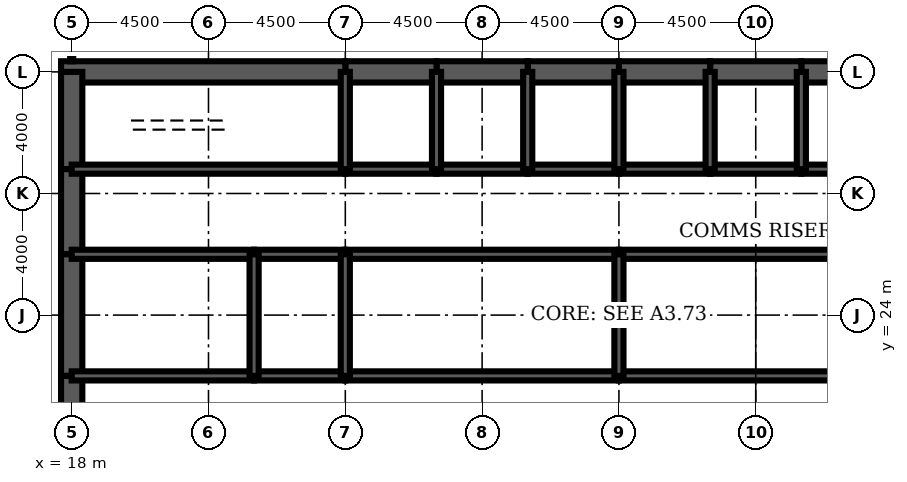
"""IFC4 building model, lengths in metres.
Left out: names, types, materials, properties, quantities, classifications, styles, units other than length and angle.
Written with IfcOpenShell. Run it as: python <this file> out.ifc"""

import sys

from ifc_helpers import new_model, si_unit, direction, frame, frame_2d, origin, place, context, subcontext, project, spatial, rectangle, extrude, element, fill, save


model = new_model("IFC4")
c1 = context("Model", 3, precision=1e-05, world=origin(), true_north=direction((0.0, 1.0)))
c2 = subcontext(c1, "Body", "Model", "MODEL_VIEW")
j1 = project(units=[si_unit("LENGTHUNIT", "METRE"), si_unit("PLANEANGLEUNIT", "RADIAN")], contexts=[c1])
p1 = place(None, origin())
s1 = spatial("IfcSite", under=j1, at=p1, CompositionType="ELEMENT")
p2 = place(p1, origin())
s2 = spatial("IfcBuilding", under=s1, at=p2, CompositionType="ELEMENT")
p3 = place(p2, frame((0.0, 0.0, 313.1)))
s3 = spatial("IfcBuildingStorey", under=s2, at=p3, CompositionType="ELEMENT", Elevation=313.1)
for number, where, z_axis, x_axis in (
    (1, (45.0, 32.0, 0.0), (0.0, 0.0, 1.0), (-1.0, 0.0, 0.0)),
    (2, (42.0, 32.0, 0.0), (0.0, 0.0, 1.0), (-1.0, 0.0, 0.0)),
    (3, (39.0, 32.0, 0.0), (0.0, 0.0, 1.0), (-1.0, 0.0, 0.0)),
    (4, (36.0, 32.0, 0.0), (0.0, 0.0, 1.0), (-1.0, 0.0, 0.0)),
    (5, (33.0, 32.0, 0.0), (0.0, 0.0, 1.0), (-1.0, 0.0, 0.0)),
    (6, (30.0, 32.0, 0.0), (0.0, 0.0, 1.0), (-1.0, 0.0, 0.0)),
):
    element("IfcWall", number, at=place(p3, frame(where, z_axis=z_axis, x_axis=x_axis)), inside=s3, PredefinedType="SHEAR", context=c2, shape_type="SweptSolid", body=[
        extrude(rectangle(XDim=3.0, YDim=0.7, at=frame_2d((1.5, 0.0))), origin(), (0.0, 0.0, 1.0), 4.2),
    ])
p4 = place(p3, frame((27.0, 32.0, 0.0), z_axis=(0.0, 0.0, 1.0), x_axis=(-1.0, 0.0, 0.0)))
e7 = element("IfcWall", 7, at=p4, inside=s3, PredefinedType="SHEAR", context=c2, shape_type="SweptSolid", body=[
    extrude(rectangle(XDim=9.35, YDim=0.7, at=frame_2d((4.675, 0.0))), origin(), (0.0, 0.0, 1.0), 4.2),
])
p5 = place(p3, frame((18.0, 32.0, 0.0), z_axis=(0.0, 0.0, 1.0), x_axis=(0.0, -1.0, 0.0)))
e8 = element("IfcWall", 8, at=p5, inside=s3, PredefinedType="SHEAR", context=c2, shape_type="SweptSolid", body=[
    extrude(rectangle(XDim=3.2, YDim=0.7, at=frame_2d((1.6, 0.0))), origin(), (0.0, 0.0, 1.0), 4.2),
])
p6 = place(p3, frame((18.0, 28.8, 0.0), z_axis=(0.0, 0.0, 1.0), x_axis=(0.0, -1.0, 0.0)))
e9 = element("IfcWall", 9, at=p6, inside=s3, PredefinedType="SHEAR", context=c2, shape_type="SweptSolid", body=[
    extrude(rectangle(XDim=2.8, YDim=0.7, at=frame_2d((1.4, 0.0))), origin(), (0.0, 0.0, 1.0), 4.2),
])
p7 = place(p6, frame((0.4, 0.0, 0.0)))
e10 = element("IfcOpeningElement", 10, at=p7, cuts=e9, PredefinedType="OPENING", context=c2, shape_type="SweptSolid", body=[
    extrude(rectangle(XDim=1.8, YDim=2.1, at=frame_2d((0.9, 1.05))), frame((0.0, 0.36, 0.0), z_axis=(0.0, -1.0, 0.0), x_axis=(1.0, 0.0, 0.0)), (0.0, 0.0, 1.0), 0.72),
])
p8 = place(p3, frame((18.0, 26.0, 0.0), z_axis=(0.0, 0.0, 1.0), x_axis=(0.0, -1.0, 0.0)))
e11 = element("IfcWall", 11, at=p8, inside=s3, PredefinedType="SHEAR", context=c2, shape_type="SweptSolid", body=[
    extrude(rectangle(XDim=4.0, YDim=0.7, at=frame_2d((2.0, 0.0))), origin(), (0.0, 0.0, 1.0), 4.2),
])
p9 = place(p3, frame((18.0, 22.0, 0.0), z_axis=(0.0, 0.0, 1.0), x_axis=(0.0, -1.0, 0.0)))
e12 = element("IfcWall", 12, at=p9, inside=s3, PredefinedType="SHEAR", context=c2, shape_type="SweptSolid", body=[
    extrude(rectangle(XDim=2.8, YDim=0.7, at=frame_2d((1.4, 0.0))), origin(), (0.0, 0.0, 1.0), 4.2),
])
p10 = place(p9, frame((0.6, 0.0, 0.0)))
e13 = element("IfcOpeningElement", 13, at=p10, cuts=e12, PredefinedType="OPENING", context=c2, shape_type="SweptSolid", body=[
    extrude(rectangle(XDim=1.8, YDim=2.1, at=frame_2d((0.9, 1.05))), frame((0.0, 0.36, 0.0), z_axis=(0.0, -1.0, 0.0), x_axis=(1.0, 0.0, 0.0)), (0.0, 0.0, 1.0), 0.72),
])
p11 = place(p3, frame((18.0, 28.8, 0.0), z_axis=(0.0, 0.0, 1.0), x_axis=(1.0, 0.0, 0.0)))
e14 = element("IfcWall", 14, at=p11, inside=s3, PredefinedType="SOLIDWALL", context=c2, shape_type="SweptSolid", body=[
    extrude(rectangle(XDim=9.0, YDim=0.3, at=frame_2d((4.5, 0.0))), origin(), (0.0, 0.0, 1.0), 4.2),
])
p12 = place(p11, frame((0.65, 0.0, 0.0)))
e15 = element("IfcOpeningElement", 15, at=p12, cuts=e14, PredefinedType="OPENING", context=c2, shape_type="SweptSolid", body=[
    extrude(rectangle(XDim=1.0, YDim=2.1, at=frame_2d((0.5, 1.05))), frame((0.0, 0.16, 0.0), z_axis=(0.0, -1.0, 0.0), x_axis=(1.0, 0.0, 0.0)), (0.0, 0.0, 1.0), 0.32),
])
p13 = place(p3, frame((27.0, 28.8, 0.0), z_axis=(0.0, 0.0, 1.0), x_axis=(1.0, 0.0, 0.0)))
e16 = element("IfcWall", 16, at=p13, inside=s3, PredefinedType="SOLIDWALL", context=c2, shape_type="SweptSolid", body=[
    extrude(rectangle(XDim=3.0, YDim=0.3, at=frame_2d((1.5, 0.0))), origin(), (0.0, 0.0, 1.0), 4.2),
])
p14 = place(p13, frame((0.95, 0.0, 0.0)))
e17 = element("IfcOpeningElement", 17, at=p14, cuts=e16, PredefinedType="OPENING", context=c2, shape_type="SweptSolid", body=[
    extrude(rectangle(XDim=1.1, YDim=2.2, at=frame_2d((0.55, 1.1))), frame((0.0, 0.16, 0.0), z_axis=(0.0, -1.0, 0.0), x_axis=(1.0, 0.0, 0.0)), (0.0, 0.0, 1.0), 0.32),
])
p15 = place(p3, frame((30.0, 28.8, 0.0), z_axis=(0.0, 0.0, 1.0), x_axis=(1.0, 0.0, 0.0)))
e18 = element("IfcWall", 18, at=p15, inside=s3, PredefinedType="SOLIDWALL", context=c2, shape_type="SweptSolid", body=[
    extrude(rectangle(XDim=3.0, YDim=0.3, at=frame_2d((1.5, 0.0))), origin(), (0.0, 0.0, 1.0), 4.2),
])
p16 = place(p15, frame((0.95, 0.0, 0.0)))
e19 = element("IfcOpeningElement", 19, at=p16, cuts=e18, PredefinedType="OPENING", context=c2, shape_type="SweptSolid", body=[
    extrude(rectangle(XDim=1.1, YDim=2.2, at=frame_2d((0.55, 1.1))), frame((0.0, 0.16, 0.0), z_axis=(0.0, -1.0, 0.0), x_axis=(1.0, 0.0, 0.0)), (0.0, 0.0, 1.0), 0.32),
])
p17 = place(p3, frame((33.0, 28.8, 0.0), z_axis=(0.0, 0.0, 1.0), x_axis=(1.0, 0.0, 0.0)))
e20 = element("IfcWall", 20, at=p17, inside=s3, PredefinedType="SOLIDWALL", context=c2, shape_type="SweptSolid", body=[
    extrude(rectangle(XDim=3.0, YDim=0.3, at=frame_2d((1.5, 0.0))), origin(), (0.0, 0.0, 1.0), 4.2),
])
p18 = place(p17, frame((0.95, 0.0, 0.0)))
e21 = element("IfcOpeningElement", 21, at=p18, cuts=e20, PredefinedType="OPENING", context=c2, shape_type="SweptSolid", body=[
    extrude(rectangle(XDim=1.1, YDim=2.2, at=frame_2d((0.55, 1.1))), frame((0.0, 0.16, 0.0), z_axis=(0.0, -1.0, 0.0), x_axis=(1.0, 0.0, 0.0)), (0.0, 0.0, 1.0), 0.32),
])
p19 = place(p3, frame((36.0, 28.8, 0.0), z_axis=(0.0, 0.0, 1.0), x_axis=(1.0, 0.0, 0.0)))
e22 = element("IfcWall", 22, at=p19, inside=s3, PredefinedType="SOLIDWALL", context=c2, shape_type="SweptSolid", body=[
    extrude(rectangle(XDim=3.0, YDim=0.3, at=frame_2d((1.5, 0.0))), origin(), (0.0, 0.0, 1.0), 4.2),
])
p20 = place(p19, frame((1.0, 0.0, 0.0)))
e23 = element("IfcOpeningElement", 23, at=p20, cuts=e22, PredefinedType="OPENING", context=c2, shape_type="SweptSolid", body=[
    extrude(rectangle(XDim=1.0, YDim=2.1, at=frame_2d((0.5, 1.05))), frame((0.0, 0.16, 0.0), z_axis=(0.0, -1.0, 0.0), x_axis=(1.0, 0.0, 0.0)), (0.0, 0.0, 1.0), 0.32),
])
p21 = place(p3, frame((39.0, 28.8, 0.0), z_axis=(0.0, 0.0, 1.0), x_axis=(1.0, 0.0, 0.0)))
e24 = element("IfcWall", 24, at=p21, inside=s3, PredefinedType="SOLIDWALL", context=c2, shape_type="SweptSolid", body=[
    extrude(rectangle(XDim=3.0, YDim=0.3, at=frame_2d((1.5, 0.0))), origin(), (0.0, 0.0, 1.0), 4.2),
])
p22 = place(p21, frame((1.0, 0.0, 0.0)))
e25 = element("IfcOpeningElement", 25, at=p22, cuts=e24, PredefinedType="OPENING", context=c2, shape_type="SweptSolid", body=[
    extrude(rectangle(XDim=1.0, YDim=2.1, at=frame_2d((0.5, 1.05))), frame((0.0, 0.16, 0.0), z_axis=(0.0, -1.0, 0.0), x_axis=(1.0, 0.0, 0.0)), (0.0, 0.0, 1.0), 0.32),
])
p23 = place(p3, frame((42.0, 28.8, 0.0), z_axis=(0.0, 0.0, 1.0), x_axis=(1.0, 0.0, 0.0)))
e26 = element("IfcWall", 26, at=p23, inside=s3, PredefinedType="SOLIDWALL", context=c2, shape_type="SweptSolid", body=[
    extrude(rectangle(XDim=3.0, YDim=0.3, at=frame_2d((1.5, 0.0))), origin(), (0.0, 0.0, 1.0), 4.2),
])
p24 = place(p23, frame((0.95, 0.0, 0.0)))
e27 = element("IfcOpeningElement", 27, at=p24, cuts=e26, PredefinedType="OPENING", context=c2, shape_type="SweptSolid", body=[
    extrude(rectangle(XDim=1.1, YDim=2.2, at=frame_2d((0.55, 1.1))), frame((0.0, 0.16, 0.0), z_axis=(0.0, -1.0, 0.0), x_axis=(1.0, 0.0, 0.0)), (0.0, 0.0, 1.0), 0.32),
])
p25 = place(p3, frame((18.0, 22.0, 0.0), z_axis=(0.0, 0.0, 1.0), x_axis=(1.0, 0.0, 0.0)))
e28 = element("IfcWall", 28, at=p25, inside=s3, PredefinedType="SOLIDWALL", context=c2, shape_type="SweptSolid", body=[
    extrude(rectangle(XDim=6.0, YDim=0.3, at=frame_2d((3.0, 0.0))), origin(), (0.0, 0.0, 1.0), 4.2),
])
p26 = place(p25, frame((4.4, 0.0, 0.0)))
e29 = element("IfcOpeningElement", 29, at=p26, cuts=e28, PredefinedType="OPENING", context=c2, shape_type="SweptSolid", body=[
    extrude(rectangle(XDim=1.0, YDim=2.1, at=frame_2d((0.5, 1.05))), frame((0.0, 0.16, 0.0), z_axis=(0.0, -1.0, 0.0), x_axis=(1.0, 0.0, 0.0)), (0.0, 0.0, 1.0), 0.32),
])
p27 = place(p25, frame((0.75, 0.0, 0.0)))
e30 = element("IfcOpeningElement", 30, at=p27, cuts=e28, PredefinedType="OPENING", context=c2, shape_type="SweptSolid", body=[
    extrude(rectangle(XDim=1.0, YDim=2.1, at=frame_2d((0.5, 1.05))), frame((0.0, 0.16, 0.0), z_axis=(0.0, -1.0, 0.0), x_axis=(1.0, 0.0, 0.0)), (0.0, 0.0, 1.0), 0.32),
])
p28 = place(p3, frame((24.0, 22.0, 0.0), z_axis=(0.0, 0.0, 1.0), x_axis=(1.0, 0.0, 0.0)))
e31 = element("IfcWall", 31, at=p28, inside=s3, PredefinedType="SOLIDWALL", context=c2, shape_type="SweptSolid", body=[
    extrude(rectangle(XDim=3.0, YDim=0.3, at=frame_2d((1.5, 0.0))), origin(), (0.0, 0.0, 1.0), 4.2),
])
p29 = place(p28, frame((1.0, 0.0, 0.0)))
e32 = element("IfcOpeningElement", 32, at=p29, cuts=e31, PredefinedType="OPENING", context=c2, shape_type="SweptSolid", body=[
    extrude(rectangle(XDim=1.0, YDim=2.1, at=frame_2d((0.5, 1.05))), frame((0.0, 0.16, 0.0), z_axis=(0.0, -1.0, 0.0), x_axis=(1.0, 0.0, 0.0)), (0.0, 0.0, 1.0), 0.32),
])
p30 = place(p3, frame((27.0, 22.0, 0.0), z_axis=(0.0, 0.0, 1.0), x_axis=(1.0, 0.0, 0.0)))
e33 = element("IfcWall", 33, at=p30, inside=s3, PredefinedType="SOLIDWALL", context=c2, shape_type="SweptSolid", body=[
    extrude(rectangle(XDim=9.0, YDim=0.3, at=frame_2d((4.5, 0.0))), origin(), (0.0, 0.0, 1.0), 4.2),
])
p31 = place(p30, frame((4.0, 0.0, 0.0)))
e34 = element("IfcOpeningElement", 34, at=p31, cuts=e33, PredefinedType="OPENING", context=c2, shape_type="SweptSolid", body=[
    extrude(rectangle(XDim=1.0, YDim=2.1, at=frame_2d((0.5, 1.05))), frame((0.0, 0.16, 0.0), z_axis=(0.0, -1.0, 0.0), x_axis=(1.0, 0.0, 0.0)), (0.0, 0.0, 1.0), 0.32),
])
p32 = place(p3, frame((36.0, 22.0, 0.0), z_axis=(0.0, 0.0, 1.0), x_axis=(1.0, 0.0, 0.0)))
e35 = element("IfcWall", 35, at=p32, inside=s3, PredefinedType="SOLIDWALL", context=c2, shape_type="SweptSolid", body=[
    extrude(rectangle(XDim=9.0, YDim=0.3, at=frame_2d((4.5, 0.0))), origin(), (0.0, 0.0, 1.0), 4.2),
])
p33 = place(p32, frame((4.0, 0.0, 0.0)))
e36 = element("IfcOpeningElement", 36, at=p33, cuts=e35, PredefinedType="OPENING", context=c2, shape_type="SweptSolid", body=[
    extrude(rectangle(XDim=1.0, YDim=2.1, at=frame_2d((0.5, 1.05))), frame((0.0, 0.16, 0.0), z_axis=(0.0, -1.0, 0.0), x_axis=(1.0, 0.0, 0.0)), (0.0, 0.0, 1.0), 0.32),
])
p34 = place(p3, frame((18.0, 26.0, 0.0), z_axis=(0.0, 0.0, 1.0), x_axis=(1.0, 0.0, 0.0)))
e37 = element("IfcWall", 37, at=p34, inside=s3, PredefinedType="SOLIDWALL", context=c2, shape_type="SweptSolid", body=[
    extrude(rectangle(XDim=6.0, YDim=0.3, at=frame_2d((3.0, 0.0))), origin(), (0.0, 0.0, 1.0), 4.2),
])
p35 = place(p3, frame((24.0, 26.0, 0.0), z_axis=(0.0, 0.0, 1.0), x_axis=(1.0, 0.0, 0.0)))
e38 = element("IfcWall", 38, at=p35, inside=s3, PredefinedType="SOLIDWALL", context=c2, shape_type="SweptSolid", body=[
    extrude(rectangle(XDim=3.0, YDim=0.3, at=frame_2d((1.5, 0.0))), origin(), (0.0, 0.0, 1.0), 4.2),
])
for number, where, z_axis, x_axis in (
    (39, (27.0, 26.0, 0.0), (0.0, 0.0, 1.0), (1.0, 0.0, 0.0)),
    (40, (36.0, 26.0, 0.0), (0.0, 0.0, 1.0), (1.0, 0.0, 0.0)),
):
    element("IfcWall", number, at=place(p3, frame(where, z_axis=z_axis, x_axis=x_axis)), inside=s3, PredefinedType="SOLIDWALL", context=c2, shape_type="SweptSolid", body=[
        extrude(rectangle(XDim=9.0, YDim=0.3, at=frame_2d((4.5, 0.0))), origin(), (0.0, 0.0, 1.0), 4.2),
    ])
for number, where, z_axis, x_axis in (
    (41, (27.0, 28.8, 0.0), (0.0, 0.0, 1.0), (0.0, 1.0, 0.0)),
    (42, (30.0, 28.8, 0.0), (0.0, 0.0, 1.0), (0.0, 1.0, 0.0)),
    (43, (33.0, 28.8, 0.0), (0.0, 0.0, 1.0), (0.0, 1.0, 0.0)),
    (44, (36.0, 28.8, 0.0), (0.0, 0.0, 1.0), (0.0, 1.0, 0.0)),
    (45, (39.0, 28.8, 0.0), (0.0, 0.0, 1.0), (0.0, 1.0, 0.0)),
    (46, (42.0, 28.8, 0.0), (0.0, 0.0, 1.0), (0.0, 1.0, 0.0)),
):
    element("IfcWall", number, at=place(p3, frame(where, z_axis=z_axis, x_axis=x_axis)), inside=s3, PredefinedType="SOLIDWALL", context=c2, shape_type="SweptSolid", body=[
        extrude(rectangle(XDim=3.2, YDim=0.3, at=frame_2d((1.6, 0.0))), origin(), (0.0, 0.0, 1.0), 4.2),
    ])
for number, where, z_axis, x_axis in (
    (47, (24.0, 22.0, 0.0), (0.0, 0.0, 1.0), (0.0, 1.0, 0.0)),
    (48, (27.0, 22.0, 0.0), (0.0, 0.0, 1.0), (0.0, 1.0, 0.0)),
    (49, (36.0, 22.0, 0.0), (0.0, 0.0, 1.0), (0.0, 1.0, 0.0)),
):
    element("IfcWall", number, at=place(p3, frame(where, z_axis=z_axis, x_axis=x_axis)), inside=s3, PredefinedType="SOLIDWALL", context=c2, shape_type="SweptSolid", body=[
        extrude(rectangle(XDim=4.0, YDim=0.3, at=frame_2d((2.0, 0.0))), origin(), (0.0, 0.0, 1.0), 4.2),
    ])
p36 = place(p3, frame((20.225, 22.15, 0.0), z_axis=(0.0, 0.0, 1.0), x_axis=(0.0, 1.0, 0.0)))
e50 = element("IfcWall", 50, at=p36, inside=s3, PredefinedType="PARTITIONING", context=c2, shape_type="SweptSolid", body=[
    extrude(rectangle(XDim=3.7, YDim=0.15, at=frame_2d((1.85, 0.0))), origin(), (0.0, 0.0, 1.0), 3.0),
])
p37 = place(p3, frame((25.2, 26.15, 0.0), z_axis=(0.0, 0.0, 1.0), x_axis=(0.0, 1.0, 0.0)))
e51 = element("IfcWall", 51, at=p37, inside=s3, PredefinedType="PARTITIONING", context=c2, shape_type="SweptSolid", body=[
    extrude(rectangle(XDim=2.5, YDim=0.15, at=frame_2d((1.25, 0.0))), origin(), (0.0, 0.0, 1.0), 3.0),
])
p38 = place(p37, frame((0.35, 0.0, 0.0)))
e52 = element("IfcOpeningElement", 52, at=p38, cuts=e51, PredefinedType="OPENING", context=c2, shape_type="SweptSolid", body=[
    extrude(rectangle(XDim=1.0, YDim=2.1, at=frame_2d((0.5, 1.05))), frame((0.0, 0.085, 0.0), z_axis=(0.0, -1.0, 0.0), x_axis=(1.0, 0.0, 0.0)), (0.0, 0.0, 1.0), 0.17),
])
p39 = place(p3, frame((18.0, 32.35, 0.0), z_axis=(0.0, 0.0, 1.0), x_axis=(0.0, 1.0, 0.0)))
e53 = element("IfcWall", 53, at=p39, inside=s3, PredefinedType="PARTITIONING", context=c2, shape_type="SweptSolid", body=[
    extrude(rectangle(XDim=5.2, YDim=0.1, at=frame_2d((2.6, 0.0))), origin(), (0.0, 0.0, 1.0), 3.0),
])
p40 = place(p39, frame((1.8, 0.0, 0.0)))
e54 = element("IfcOpeningElement", 54, at=p40, cuts=e53, PredefinedType="OPENING", context=c2, shape_type="SweptSolid", body=[
    extrude(rectangle(XDim=1.6, YDim=2.1, at=frame_2d((0.8, 1.05))), frame((0.0, 0.06, 0.0), z_axis=(0.0, -1.0, 0.0), x_axis=(1.0, 0.0, 0.0)), (0.0, 0.0, 1.0), 0.12),
])
p41 = place(p38, origin())
e55 = element("IfcDoor", 55, at=p41, inside=s3, OperationType="SINGLE_SWING_LEFT", PredefinedType="DOOR", context=c2, shape_type="SweptSolid", body=[
    extrude(rectangle(XDim=1.0, YDim=2.1, at=frame_2d((0.5, 1.05))), frame((0.0, 0.025, 0.0), z_axis=(0.0, -1.0, 0.0), x_axis=(1.0, 0.0, 0.0)), (0.0, 0.0, 1.0), 0.05),
])
fill(e52, e55)
p42 = place(p14, origin())
e56 = element("IfcDoor", 56, at=p42, inside=s3, OperationType="DOUBLE_DOOR_SLIDING", PredefinedType="USERDEFINED", context=c2, shape_type="SweptSolid", body=[
    extrude(rectangle(XDim=1.1, YDim=2.2, at=frame_2d((0.55, 1.1))), frame((0.0, 0.025, 0.0), z_axis=(0.0, -1.0, 0.0), x_axis=(1.0, 0.0, 0.0)), (0.0, 0.0, 1.0), 0.05),
])
fill(e17, e56)
p43 = place(p16, origin())
e57 = element("IfcDoor", 57, at=p43, inside=s3, OperationType="DOUBLE_DOOR_SLIDING", PredefinedType="USERDEFINED", context=c2, shape_type="SweptSolid", body=[
    extrude(rectangle(XDim=1.1, YDim=2.2, at=frame_2d((0.55, 1.1))), frame((0.0, 0.025, 0.0), z_axis=(0.0, -1.0, 0.0), x_axis=(1.0, 0.0, 0.0)), (0.0, 0.0, 1.0), 0.05),
])
fill(e19, e57)
p44 = place(p18, origin())
e58 = element("IfcDoor", 58, at=p44, inside=s3, OperationType="DOUBLE_DOOR_SLIDING", PredefinedType="USERDEFINED", context=c2, shape_type="SweptSolid", body=[
    extrude(rectangle(XDim=1.1, YDim=2.2, at=frame_2d((0.55, 1.1))), frame((0.0, 0.025, 0.0), z_axis=(0.0, -1.0, 0.0), x_axis=(1.0, 0.0, 0.0)), (0.0, 0.0, 1.0), 0.05),
])
fill(e21, e58)
p45 = place(p12, origin())
e59 = element("IfcDoor", 59, at=p45, inside=s3, OperationType="SINGLE_SWING_LEFT", PredefinedType="DOOR", context=c2, shape_type="SweptSolid", body=[
    extrude(rectangle(XDim=1.0, YDim=2.1, at=frame_2d((0.5, 1.05))), frame((0.0, 0.025, 0.0), z_axis=(0.0, -1.0, 0.0), x_axis=(1.0, 0.0, 0.0)), (0.0, 0.0, 1.0), 0.05),
])
fill(e15, e59)
p46 = place(p10, origin())
e60 = element("IfcDoor", 60, at=p46, inside=s3, OperationType="SINGLE_SWING_LEFT", PredefinedType="DOOR", context=c2, shape_type="SweptSolid", body=[
    extrude(rectangle(XDim=1.8, YDim=2.1, at=frame_2d((0.9, 1.05))), frame((0.0, 0.35, 0.0), z_axis=(0.0, -1.0, 0.0), x_axis=(1.0, 0.0, 0.0)), (0.0, 0.0, 1.0), 0.699),
])
fill(e13, e60)
p47 = place(p7, origin())
e61 = element("IfcDoor", 61, at=p47, inside=s3, OperationType="SINGLE_SWING_LEFT", PredefinedType="DOOR", context=c2, shape_type="SweptSolid", body=[
    extrude(rectangle(XDim=1.8, YDim=2.1, at=frame_2d((0.9, 1.05))), frame((0.0, 0.35, 0.0), z_axis=(0.0, -1.0, 0.0), x_axis=(1.0, 0.0, 0.0)), (0.0, 0.0, 1.0), 0.699),
])
fill(e10, e61)
p48 = place(p26, origin())
e62 = element("IfcDoor", 62, at=p48, inside=s3, OperationType="SINGLE_SWING_RIGHT", PredefinedType="DOOR", context=c2, shape_type="SweptSolid", body=[
    extrude(rectangle(XDim=1.0, YDim=2.1, at=frame_2d((0.5, 1.05))), frame((0.0, 0.025, 0.0), z_axis=(0.0, -1.0, 0.0), x_axis=(1.0, 0.0, 0.0)), (0.0, 0.0, 1.0), 0.05),
])
fill(e29, e62)
p49 = place(p29, origin())
e63 = element("IfcDoor", 63, at=p49, inside=s3, OperationType="SINGLE_SWING_LEFT", PredefinedType="DOOR", context=c2, shape_type="SweptSolid", body=[
    extrude(rectangle(XDim=1.0, YDim=2.1, at=frame_2d((0.5, 1.05))), frame((0.0, 0.025, 0.0), z_axis=(0.0, -1.0, 0.0), x_axis=(1.0, 0.0, 0.0)), (0.0, 0.0, 1.0), 0.05),
])
fill(e32, e63)
p50 = place(p31, origin())
e64 = element("IfcDoor", 64, at=p50, inside=s3, OperationType="SINGLE_SWING_LEFT", PredefinedType="DOOR", context=c2, shape_type="SweptSolid", body=[
    extrude(rectangle(XDim=1.0, YDim=2.1, at=frame_2d((0.5, 1.05))), frame((0.0, 0.025, 0.0), z_axis=(0.0, -1.0, 0.0), x_axis=(1.0, 0.0, 0.0)), (0.0, 0.0, 1.0), 0.05),
])
fill(e34, e64)
p51 = place(p33, origin())
e65 = element("IfcDoor", 65, at=p51, inside=s3, OperationType="SINGLE_SWING_LEFT", PredefinedType="DOOR", context=c2, shape_type="SweptSolid", body=[
    extrude(rectangle(XDim=1.0, YDim=2.1, at=frame_2d((0.5, 1.05))), frame((0.0, 0.025, 0.0), z_axis=(0.0, -1.0, 0.0), x_axis=(1.0, 0.0, 0.0)), (0.0, 0.0, 1.0), 0.05),
])
fill(e36, e65)
p52 = place(p27, origin())
e66 = element("IfcDoor", 66, at=p52, inside=s3, OperationType="SINGLE_SWING_LEFT", PredefinedType="DOOR", context=c2, shape_type="SweptSolid", body=[
    extrude(rectangle(XDim=1.0, YDim=2.1, at=frame_2d((0.5, 1.05))), frame((0.0, 0.025, 0.0), z_axis=(0.0, -1.0, 0.0), x_axis=(1.0, 0.0, 0.0)), (0.0, 0.0, 1.0), 0.05),
])
fill(e30, e66)
p53 = place(p20, origin())
e67 = element("IfcDoor", 67, at=p53, inside=s3, OperationType="SINGLE_SWING_LEFT", PredefinedType="DOOR", context=c2, shape_type="SweptSolid", body=[
    extrude(rectangle(XDim=1.0, YDim=2.1, at=frame_2d((0.5, 1.05))), frame((0.0, 0.025, 0.0), z_axis=(0.0, -1.0, 0.0), x_axis=(1.0, 0.0, 0.0)), (0.0, 0.0, 1.0), 0.05),
])
fill(e23, e67)
p54 = place(p22, origin())
e68 = element("IfcDoor", 68, at=p54, inside=s3, OperationType="SINGLE_SWING_LEFT", PredefinedType="DOOR", context=c2, shape_type="SweptSolid", body=[
    extrude(rectangle(XDim=1.0, YDim=2.1, at=frame_2d((0.5, 1.05))), frame((0.0, 0.025, 0.0), z_axis=(0.0, -1.0, 0.0), x_axis=(1.0, 0.0, 0.0)), (0.0, 0.0, 1.0), 0.05),
])
fill(e25, e68)
save(model, sys.argv[1])
